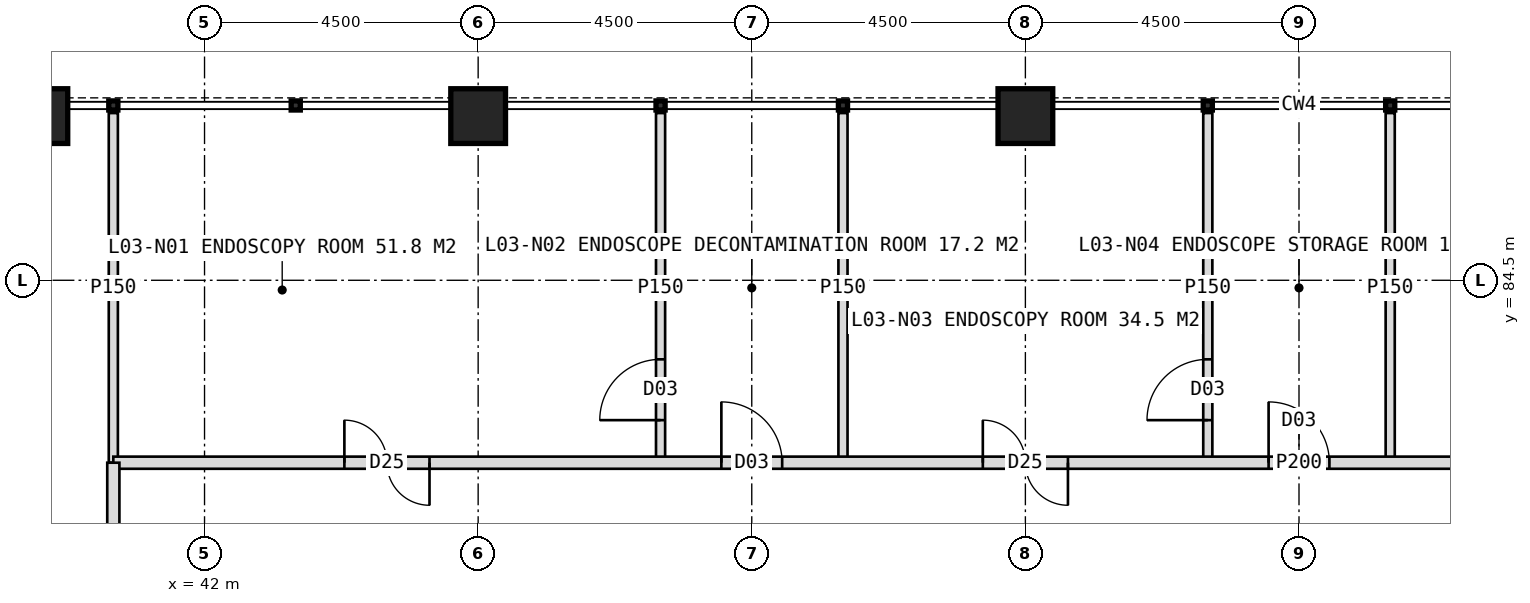
"""IFC4 building model, lengths in metres.
Left out: names, types, materials, properties, quantities, classifications, styles, units other than length and angle.
Written with IfcOpenShell. Run it as: python <this file> out.ifc"""

import sys

from ifc_helpers import new_model, si_unit, direction, frame, frame_2d, origin, origin_2d, place, context, subcontext, project, spatial, rectangle, hollow_rectangle, extrude, element, fill, save


model = new_model("IFC4")
c1 = context("Model", 3, precision=1e-05, world=origin(), true_north=direction((0.0, 1.0)))
c2 = subcontext(c1, "Body", "Model", "MODEL_VIEW")
j1 = project(units=[si_unit("LENGTHUNIT", "METRE"), si_unit("PLANEANGLEUNIT", "RADIAN")], contexts=[c1])
p1 = place(None, origin())
s1 = spatial("IfcSite", under=j1, at=p1, CompositionType="ELEMENT")
p2 = place(p1, origin())
s2 = spatial("IfcBuilding", under=s1, at=p2, CompositionType="ELEMENT")
p3 = place(p2, frame((0.0, 0.0, 16.5)))
s3 = spatial("IfcBuildingStorey", under=s2, at=p3, CompositionType="ELEMENT", Elevation=16.5)
for number, where, z_axis, x_axis in (
    (1, (39.3, 87.2, 0.0), (0.0, 0.0, 1.0), (1.0, 0.0, 0.0)),
    (2, (46.5, 87.2, 0.0), (0.0, 0.0, 1.0), (1.0, 0.0, 0.0)),
    (3, (55.5, 87.2, 0.0), (0.0, 0.0, 1.0), (1.0, 0.0, 0.0)),
):
    element("IfcColumn", number, at=place(p3, frame(where, z_axis=z_axis, x_axis=x_axis)), inside=s3, PredefinedType="COLUMN", context=c2, shape_type="SweptSolid", body=[
        extrude(hollow_rectangle(XDim=0.9, YDim=0.9, WallThickness=0.08, at=origin_2d()), origin(), (0.0, 0.0, 1.0), 4.5),
    ])
p4 = place(p3, frame((40.5, 81.5, 0.0), z_axis=(0.0, 0.0, 1.0), x_axis=(0.0, 1.0, 0.0)))
e4 = element("IfcWall", 4, at=p4, inside=s3, PredefinedType="PARTITIONING", context=c2, shape_type="SweptSolid", body=[
    extrude(rectangle(XDim=5.75, YDim=0.15, at=frame_2d((2.875, 0.0))), origin(), (0.0, 0.0, 1.0), 4.2),
])
p5 = place(p3, frame((49.5, 81.5, 0.0), z_axis=(0.0, 0.0, 1.0), x_axis=(0.0, 1.0, 0.0)))
e5 = element("IfcWall", 5, at=p5, inside=s3, PredefinedType="PARTITIONING", context=c2, shape_type="SweptSolid", body=[
    extrude(rectangle(XDim=5.75, YDim=0.15, at=frame_2d((2.875, 0.0))), origin(), (0.0, 0.0, 1.0), 4.2),
])
p6 = place(p5, frame((0.7, 0.0, 0.0)))
e6 = element("IfcOpeningElement", 6, at=p6, cuts=e5, PredefinedType="OPENING", context=c2, shape_type="SweptSolid", body=[
    extrude(rectangle(XDim=1.0, YDim=2.1, at=frame_2d((0.5, 1.05))), frame((0.0, 0.085, 0.0), z_axis=(0.0, -1.0, 0.0), x_axis=(1.0, 0.0, 0.0)), (0.0, 0.0, 1.0), 0.17),
])
p7 = place(p3, frame((52.5, 81.5, 0.0), z_axis=(0.0, 0.0, 1.0), x_axis=(0.0, 1.0, 0.0)))
e7 = element("IfcWall", 7, at=p7, inside=s3, PredefinedType="PARTITIONING", context=c2, shape_type="SweptSolid", body=[
    extrude(rectangle(XDim=5.75, YDim=0.15, at=frame_2d((2.875, 0.0))), origin(), (0.0, 0.0, 1.0), 4.2),
])
p8 = place(p3, frame((58.5, 81.5, 0.0), z_axis=(0.0, 0.0, 1.0), x_axis=(0.0, 1.0, 0.0)))
e8 = element("IfcWall", 8, at=p8, inside=s3, PredefinedType="PARTITIONING", context=c2, shape_type="SweptSolid", body=[
    extrude(rectangle(XDim=5.75, YDim=0.15, at=frame_2d((2.875, 0.0))), origin(), (0.0, 0.0, 1.0), 4.2),
])
p9 = place(p8, frame((0.7, 0.0, 0.0)))
e9 = element("IfcOpeningElement", 9, at=p9, cuts=e8, PredefinedType="OPENING", context=c2, shape_type="SweptSolid", body=[
    extrude(rectangle(XDim=1.0, YDim=2.1, at=frame_2d((0.5, 1.05))), frame((0.0, 0.085, 0.0), z_axis=(0.0, -1.0, 0.0), x_axis=(1.0, 0.0, 0.0)), (0.0, 0.0, 1.0), 0.17),
])
p10 = place(p3, frame((61.5, 81.5, 0.0), z_axis=(0.0, 0.0, 1.0), x_axis=(0.0, 1.0, 0.0)))
e10 = element("IfcWall", 10, at=p10, inside=s3, PredefinedType="PARTITIONING", context=c2, shape_type="SweptSolid", body=[
    extrude(rectangle(XDim=5.75, YDim=0.15, at=frame_2d((2.875, 0.0))), origin(), (0.0, 0.0, 1.0), 4.2),
])
p11 = place(p3, frame((40.5, 81.5, 0.0), z_axis=(0.0, 0.0, 1.0), x_axis=(1.0, 0.0, 0.0)))
e11 = element("IfcWall", 11, at=p11, inside=s3, PredefinedType="PARTITIONING", context=c2, shape_type="SweptSolid", body=[
    extrude(rectangle(XDim=39.0, YDim=0.2, at=frame_2d((19.5, 0.0))), origin(), (0.0, 0.0, 1.0), 4.2),
])
p12 = place(p11, frame((3.8, 0.0, 0.0)))
e12 = element("IfcOpeningElement", 12, at=p12, cuts=e11, PredefinedType="OPENING", context=c2, shape_type="SweptSolid", body=[
    extrude(rectangle(XDim=1.4, YDim=2.2, at=frame_2d((0.7, 1.1))), frame((0.0, 0.11, 0.0), z_axis=(0.0, -1.0, 0.0), x_axis=(1.0, 0.0, 0.0)), (0.0, 0.0, 1.0), 0.22),
])
p13 = place(p11, frame((10.0, 0.0, 0.0)))
e13 = element("IfcOpeningElement", 13, at=p13, cuts=e11, PredefinedType="OPENING", context=c2, shape_type="SweptSolid", body=[
    extrude(rectangle(XDim=1.0, YDim=2.1, at=frame_2d((0.5, 1.05))), frame((0.0, 0.11, 0.0), z_axis=(0.0, -1.0, 0.0), x_axis=(1.0, 0.0, 0.0)), (0.0, 0.0, 1.0), 0.22),
])
p14 = place(p11, frame((14.3, 0.0, 0.0)))
e14 = element("IfcOpeningElement", 14, at=p14, cuts=e11, PredefinedType="OPENING", context=c2, shape_type="SweptSolid", body=[
    extrude(rectangle(XDim=1.4, YDim=2.2, at=frame_2d((0.7, 1.1))), frame((0.0, 0.11, 0.0), z_axis=(0.0, -1.0, 0.0), x_axis=(1.0, 0.0, 0.0)), (0.0, 0.0, 1.0), 0.22),
])
p15 = place(p11, frame((19.0, 0.0, 0.0)))
e15 = element("IfcOpeningElement", 15, at=p15, cuts=e11, PredefinedType="OPENING", context=c2, shape_type="SweptSolid", body=[
    extrude(rectangle(XDim=1.0, YDim=2.1, at=frame_2d((0.5, 1.05))), frame((0.0, 0.11, 0.0), z_axis=(0.0, -1.0, 0.0), x_axis=(1.0, 0.0, 0.0)), (0.0, 0.0, 1.0), 0.22),
])
p16 = place(p11, frame((29.2, 0.0, 0.0)))
e16 = element("IfcOpeningElement", 16, at=p16, cuts=e11, PredefinedType="OPENING", context=c2, shape_type="SweptSolid", body=[
    extrude(rectangle(XDim=1.6, YDim=2.2, at=frame_2d((0.8, 1.1))), frame((0.0, 0.11, 0.0), z_axis=(0.0, -1.0, 0.0), x_axis=(1.0, 0.0, 0.0)), (0.0, 0.0, 1.0), 0.22),
])
p17 = place(p3, frame((40.5, 42.5, 0.0), z_axis=(0.0, 0.0, 1.0), x_axis=(0.0, 1.0, 0.0)))
e17 = element("IfcWall", 17, at=p17, inside=s3, PredefinedType="PARTITIONING", context=c2, shape_type="SweptSolid", body=[
    extrude(rectangle(XDim=39.0, YDim=0.2, at=frame_2d((19.5, 0.0))), origin(), (0.0, 0.0, 1.0), 4.2),
])
p18 = place(p17, frame((0.65, 0.0, 0.0)))
e18 = element("IfcOpeningElement", 18, at=p18, cuts=e17, PredefinedType="OPENING", context=c2, shape_type="SweptSolid", body=[
    extrude(rectangle(XDim=1.6, YDim=2.2, at=frame_2d((0.8, 1.1))), frame((0.0, 0.11, 0.0), z_axis=(0.0, -1.0, 0.0), x_axis=(1.0, 0.0, 0.0)), (0.0, 0.0, 1.0), 0.22),
])
p19 = place(p17, frame((7.4, 0.0, 0.0)))
e19 = element("IfcOpeningElement", 19, at=p19, cuts=e17, PredefinedType="OPENING", context=c2, shape_type="SweptSolid", body=[
    extrude(rectangle(XDim=1.6, YDim=2.2, at=frame_2d((0.8, 1.1))), frame((0.0, 0.11, 0.0), z_axis=(0.0, -1.0, 0.0), x_axis=(1.0, 0.0, 0.0)), (0.0, 0.0, 1.0), 0.22),
])
p20 = place(p17, frame((15.7, 0.0, 0.0)))
e20 = element("IfcOpeningElement", 20, at=p20, cuts=e17, PredefinedType="OPENING", context=c2, shape_type="SweptSolid", body=[
    extrude(rectangle(XDim=1.6, YDim=2.2, at=frame_2d((0.8, 1.1))), frame((0.0, 0.11, 0.0), z_axis=(0.0, -1.0, 0.0), x_axis=(1.0, 0.0, 0.0)), (0.0, 0.0, 1.0), 0.22),
])
p21 = place(p17, frame((19.95, 0.0, 0.0)))
e21 = element("IfcOpeningElement", 21, at=p21, cuts=e17, PredefinedType="OPENING", context=c2, shape_type="SweptSolid", body=[
    extrude(rectangle(XDim=1.6, YDim=2.2, at=frame_2d((0.8, 1.1))), frame((0.0, 0.11, 0.0), z_axis=(0.0, -1.0, 0.0), x_axis=(1.0, 0.0, 0.0)), (0.0, 0.0, 1.0), 0.22),
])
p22 = place(p17, frame((24.45, 0.0, 0.0)))
e22 = element("IfcOpeningElement", 22, at=p22, cuts=e17, PredefinedType="OPENING", context=c2, shape_type="SweptSolid", body=[
    extrude(rectangle(XDim=1.6, YDim=2.2, at=frame_2d((0.8, 1.1))), frame((0.0, 0.11, 0.0), z_axis=(0.0, -1.0, 0.0), x_axis=(1.0, 0.0, 0.0)), (0.0, 0.0, 1.0), 0.22),
])
p23 = place(p17, frame((32.95, 0.0, 0.0)))
e23 = element("IfcOpeningElement", 23, at=p23, cuts=e17, PredefinedType="OPENING", context=c2, shape_type="SweptSolid", body=[
    extrude(rectangle(XDim=1.6, YDim=2.2, at=frame_2d((0.8, 1.1))), frame((0.0, 0.11, 0.0), z_axis=(0.0, -1.0, 0.0), x_axis=(1.0, 0.0, 0.0)), (0.0, 0.0, 1.0), 0.22),
])
p24 = place(p12, origin())
e24 = element("IfcDoor", 24, at=p24, inside=s3, OperationType="DOUBLE_DOOR_SINGLE_SWING", PredefinedType="DOOR", context=c2, shape_type="SweptSolid", body=[
    extrude(rectangle(XDim=1.4, YDim=2.2, at=frame_2d((0.7, 1.1))), frame((0.0, 0.025, 0.0), z_axis=(0.0, -1.0, 0.0), x_axis=(1.0, 0.0, 0.0)), (0.0, 0.0, 1.0), 0.05),
])
fill(e12, e24)
p25 = place(p13, origin())
e25 = element("IfcDoor", 25, at=p25, inside=s3, OperationType="SINGLE_SWING_LEFT", PredefinedType="DOOR", context=c2, shape_type="SweptSolid", body=[
    extrude(rectangle(XDim=1.0, YDim=2.1, at=frame_2d((0.5, 1.05))), frame((0.0, 0.025, 0.0), z_axis=(0.0, -1.0, 0.0), x_axis=(1.0, 0.0, 0.0)), (0.0, 0.0, 1.0), 0.05),
])
fill(e13, e25)
p26 = place(p6, origin())
e26 = element("IfcDoor", 26, at=p26, inside=s3, OperationType="SINGLE_SWING_LEFT", PredefinedType="DOOR", context=c2, shape_type="SweptSolid", body=[
    extrude(rectangle(XDim=1.0, YDim=2.1, at=frame_2d((0.5, 1.05))), frame((0.0, 0.025, 0.0), z_axis=(0.0, -1.0, 0.0), x_axis=(1.0, 0.0, 0.0)), (0.0, 0.0, 1.0), 0.05),
])
fill(e6, e26)
p27 = place(p14, origin())
e27 = element("IfcDoor", 27, at=p27, inside=s3, OperationType="DOUBLE_DOOR_SINGLE_SWING", PredefinedType="DOOR", context=c2, shape_type="SweptSolid", body=[
    extrude(rectangle(XDim=1.4, YDim=2.2, at=frame_2d((0.7, 1.1))), frame((0.0, 0.025, 0.0), z_axis=(0.0, -1.0, 0.0), x_axis=(1.0, 0.0, 0.0)), (0.0, 0.0, 1.0), 0.05),
])
fill(e14, e27)
p28 = place(p15, origin())
e28 = element("IfcDoor", 28, at=p28, inside=s3, OperationType="SINGLE_SWING_LEFT", PredefinedType="DOOR", context=c2, shape_type="SweptSolid", body=[
    extrude(rectangle(XDim=1.0, YDim=2.1, at=frame_2d((0.5, 1.05))), frame((0.0, 0.025, 0.0), z_axis=(0.0, -1.0, 0.0), x_axis=(1.0, 0.0, 0.0)), (0.0, 0.0, 1.0), 0.05),
])
fill(e15, e28)
p29 = place(p9, origin())
e29 = element("IfcDoor", 29, at=p29, inside=s3, OperationType="SINGLE_SWING_LEFT", PredefinedType="DOOR", context=c2, shape_type="SweptSolid", body=[
    extrude(rectangle(XDim=1.0, YDim=2.1, at=frame_2d((0.5, 1.05))), frame((0.0, 0.025, 0.0), z_axis=(0.0, -1.0, 0.0), x_axis=(1.0, 0.0, 0.0)), (0.0, 0.0, 1.0), 0.05),
])
fill(e9, e29)
save(model, sys.argv[1])
